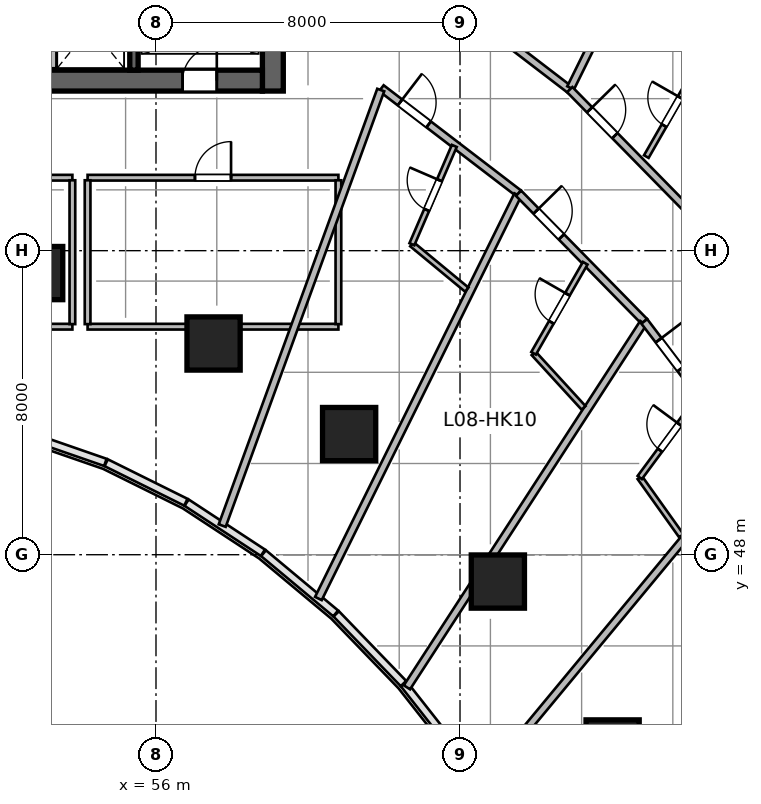
"""IFC4 building model, lengths in metres.
Left out: names, types, materials, properties, quantities, classifications, styles, units other than length and angle.
Written with IfcOpenShell. Run it as: python <this file> out.ifc"""

import sys

from ifc_helpers import new_model, si_unit, direction, frame, frame_2d, origin, origin_2d, place, context, subcontext, project, spatial, rectangle, circle, extrude, source, transform, mapped, element, fill, save


model = new_model("IFC4")
c1 = context("Model", 3, precision=1e-05, world=origin(), true_north=direction((0.0, 1.0)))
c2 = subcontext(c1, "Body", "Model", "MODEL_VIEW")
j1 = project(units=[si_unit("LENGTHUNIT", "METRE"), si_unit("PLANEANGLEUNIT", "RADIAN")], contexts=[c1])
p1 = place(None, origin())
s1 = spatial("IfcSite", under=j1, at=p1, CompositionType="ELEMENT")
p2 = place(p1, origin())
s2 = spatial("IfcBuilding", under=s1, at=p2, CompositionType="ELEMENT")
p3 = place(p2, frame((0.0, 0.0, 42.6)))
s3 = spatial("IfcBuildingStorey", under=s2, at=p3, CompositionType="ELEMENT", Elevation=42.6)
m1 = source(origin(), c2, "Body", "SweptSolid", [
    extrude(rectangle(XDim=12.0, YDim=0.55, at=frame_2d((6.0, 0.0))), origin(), (0.0, 0.0, 1.0), 3.6),
])
p4 = place(p3, frame((59.075, 60.2, 0.0), z_axis=(0.0, 0.0, 1.0), x_axis=(0.0, 1.0, 0.0)))
e1 = element("IfcWall", 1, at=p4, inside=s3, PredefinedType="SHEAR", context=c2, shape_type="MappedRepresentation", body=[
    mapped(m1, transform((0.0, 0.0, 0.0), scale=1.0)),
])
m2 = source(origin(), c2, "Body", "SweptSolid", [
    extrude(rectangle(XDim=21.6, YDim=0.55, at=frame_2d((10.8, 0.0))), origin(), (0.0, 0.0, 1.0), 3.6),
])
p5 = place(p3, frame((37.2, 60.475, 0.0), z_axis=(0.0, 0.0, 1.0), x_axis=(1.0, 0.0, 0.0)))
e2 = element("IfcWall", 2, at=p5, inside=s3, PredefinedType="SHEAR", context=c2, shape_type="MappedRepresentation", body=[
    mapped(m2, transform((0.0, 0.0, 0.0), scale=1.0)),
])
p6 = place(p5, frame((1.1, 0.0, 0.0)))
e3 = element("IfcOpeningElement", 3, at=p6, cuts=e2, PredefinedType="OPENING", context=c2, shape_type="SweptSolid", body=[
    extrude(rectangle(XDim=1.15, YDim=2.15, at=frame_2d((0.575, 1.075))), frame((0.0, 0.285, 0.0), z_axis=(0.0, -1.0, 0.0), x_axis=(1.0, 0.0, 0.0)), (0.0, 0.0, 1.0), 0.57),
])
p7 = place(p5, frame((19.5, 0.0, 0.0)))
e4 = element("IfcOpeningElement", 4, at=p7, cuts=e2, PredefinedType="OPENING", context=c2, shape_type="SweptSolid", body=[
    extrude(rectangle(XDim=0.9, YDim=2.1, at=frame_2d((0.45, 1.05))), frame((0.0, 0.285, 0.0), z_axis=(0.0, -1.0, 0.0), x_axis=(1.0, 0.0, 0.0)), (0.0, 0.0, 1.0), 0.57),
])
p8 = place(p5, frame((12.02, 0.0, 0.0)))
e5 = element("IfcOpeningElement", 5, at=p8, cuts=e2, PredefinedType="OPENING", context=c2, shape_type="SweptSolid", body=[
    extrude(rectangle(XDim=1.6, YDim=2.15, at=frame_2d((0.8, 1.075))), frame((0.0, 0.285, 0.0), z_axis=(0.0, -1.0, 0.0), x_axis=(1.0, 0.0, 0.0)), (0.0, 0.0, 1.0), 0.57),
])
m3 = source(origin(), c2, "Body", "SweptSolid", [
    extrude(rectangle(XDim=10.9, YDim=0.22, at=frame_2d((5.45, 0.0))), origin(), (0.0, 0.0, 1.0), 3.6),
])
p9 = place(p3, frame((55.42, 60.75, 0.0), z_axis=(0.0, 0.0, 1.0), x_axis=(0.0, 1.0, 0.0)))
e6 = element("IfcWall", 6, at=p9, inside=s3, PredefinedType="SHEAR", context=c2, shape_type="MappedRepresentation", body=[
    mapped(m3, transform((0.0, 0.0, 0.0), scale=1.0)),
])
p10 = place(p9, frame((9.495, 0.0, 0.0)))
e7 = element("IfcOpeningElement", 7, at=p10, cuts=e6, PredefinedType="OPENING", context=c2, shape_type="SweptSolid", body=[
    extrude(rectangle(XDim=1.15, YDim=2.15, at=frame_2d((0.575, 1.075))), frame((0.0, 0.12, 0.0), z_axis=(0.0, -1.0, 0.0), x_axis=(1.0, 0.0, 0.0)), (0.0, 0.0, 1.0), 0.24),
])
m4 = source(origin(), c2, "Body", "SweptSolid", [
    extrude(circle(Radius=0.7, at=origin_2d()), origin(), (0.0, 0.0, 1.0), 3.6),
])
for number, where, z_axis, x_axis in (
    (8, (52.846, 55.411, 0.0), (0.0, 0.0, 1.0), (0.143, 0.99, 0.0)),
    (9, (57.515, 53.558, 0.0), (0.0, 0.0, 1.0), (0.289, 0.957, 0.0)),
    (10, (61.082, 51.175, 0.0), (0.0, 0.0, 1.0), (0.409, 0.912, 0.0)),
    (11, (64.996, 47.294, 0.0), (0.0, 0.0, 1.0), (0.558, 0.83, 0.0)),
    (12, (68.015, 42.955, 0.0), (0.0, 0.0, 1.0), (0.691, 0.723, 0.0)),
):
    element("IfcColumn", number, at=place(p3, frame(where, z_axis=z_axis, x_axis=x_axis)), inside=s3, PredefinedType="COLUMN", context=c2, shape_type="MappedRepresentation", body=[
        mapped(m4, transform((0.0, 0.0, 0.0), scale=1.0)),
    ])
m5 = source(origin(), c2, "Body", "SweptSolid", [
    extrude(rectangle(XDim=2.2, YDim=0.2, at=frame_2d((1.1, 0.0))), origin(), (0.0, 0.0, 1.0), 3.36),
])
p11 = place(p3, frame((53.28, 60.8, 0.0), z_axis=(0.0, 0.0, 1.0), x_axis=(0.0, 1.0, 0.0)))
e13 = element("IfcWall", 13, at=p11, inside=s3, PredefinedType="SOLIDWALL", context=c2, shape_type="MappedRepresentation", body=[
    mapped(m5, transform((0.0, 0.0, 0.0), scale=1.0)),
])
m6 = source(origin(), c2, "Body", "SweptSolid", [
    extrude(rectangle(XDim=11.6, YDim=0.15, at=frame_2d((5.8, 0.0))), origin(), (0.0, 0.0, 1.0), 3.36),
])
p12 = place(p3, frame((42.2, 54.0, 0.0), z_axis=(0.0, 0.0, 1.0), x_axis=(1.0, 0.0, 0.0)))
e14 = element("IfcWall", 14, at=p12, inside=s3, PredefinedType="PARTITIONING", context=c2, shape_type="MappedRepresentation", body=[
    mapped(m6, transform((0.0, 0.0, 0.0), scale=1.0)),
])
p13 = place(p3, frame((42.2, 57.92, 0.0), z_axis=(0.0, 0.0, 1.0), x_axis=(1.0, 0.0, 0.0)))
e15 = element("IfcWall", 15, at=p13, inside=s3, PredefinedType="PARTITIONING", context=c2, shape_type="MappedRepresentation", body=[
    mapped(m6, transform((0.0, 0.0, 0.0), scale=1.0)),
])
p14 = place(p13, frame((6.9, 0.0, 0.0)))
e16 = element("IfcOpeningElement", 16, at=p14, cuts=e15, PredefinedType="OPENING", context=c2, shape_type="SweptSolid", body=[
    extrude(rectangle(XDim=1.1, YDim=2.15, at=frame_2d((0.55, 1.075))), frame((0.0, 0.085, 0.0), z_axis=(0.0, -1.0, 0.0), x_axis=(1.0, 0.0, 0.0)), (0.0, 0.0, 1.0), 0.17),
])
m7 = source(origin(), c2, "Body", "SweptSolid", [
    extrude(rectangle(XDim=3.785, YDim=0.15, at=frame_2d((1.893, 0.0))), origin(), (0.0, 0.0, 1.0), 3.36),
])
p15 = place(p3, frame((53.8, 54.067, 0.0), z_axis=(0.0, 0.0, 1.0), x_axis=(0.0, 1.0, 0.0)))
e17 = element("IfcWall", 17, at=p15, inside=s3, PredefinedType="PARTITIONING", context=c2, shape_type="MappedRepresentation", body=[
    mapped(m7, transform((0.0, 0.0, 0.0), scale=1.0)),
])
m8 = source(origin(), c2, "Body", "SweptSolid", [
    extrude(rectangle(XDim=6.6, YDim=0.15, at=frame_2d((3.3, 0.0))), origin(), (0.0, 0.0, 1.0), 2.803),
])
p16 = place(p3, frame((54.2, 54.0, 0.0), z_axis=(0.0, 0.0, 1.0), x_axis=(1.0, 0.0, 0.0)))
e18 = element("IfcWall", 18, at=p16, inside=s3, PredefinedType="PARTITIONING", context=c2, shape_type="MappedRepresentation", body=[
    mapped(m8, transform((0.0, 0.0, 0.0), scale=1.0)),
])
m9 = source(origin(), c2, "Body", "SweptSolid", [
    extrude(rectangle(XDim=6.6, YDim=0.15, at=frame_2d((3.3, 0.0))), origin(), (0.0, 0.0, 1.0), 3.36),
])
p17 = place(p3, frame((54.2, 57.92, 0.0), z_axis=(0.0, 0.0, 1.0), x_axis=(1.0, 0.0, 0.0)))
e19 = element("IfcWall", 19, at=p17, inside=s3, PredefinedType="PARTITIONING", context=c2, shape_type="MappedRepresentation", body=[
    mapped(m9, transform((0.0, 0.0, 0.0), scale=1.0)),
])
p18 = place(p17, frame((2.825, 0.0, 0.0)))
e20 = element("IfcOpeningElement", 20, at=p18, cuts=e19, PredefinedType="OPENING", context=c2, shape_type="SweptSolid", body=[
    extrude(rectangle(XDim=0.95, YDim=2.1, at=frame_2d((0.475, 1.05))), frame((0.0, 0.085, 0.0), z_axis=(0.0, -1.0, 0.0), x_axis=(1.0, 0.0, 0.0)), (0.0, 0.0, 1.0), 0.17),
])
for number, where, z_axis, x_axis in (
    (21, (54.2, 54.067, 0.0), (0.0, 0.0, 1.0), (0.0, 1.0, 0.0)),
    (22, (60.8, 54.067, 0.0), (0.0, 0.0, 1.0), (0.0, 1.0, 0.0)),
):
    element("IfcWall", number, at=place(p3, frame(where, z_axis=z_axis, x_axis=x_axis)), inside=s3, PredefinedType="PARTITIONING", context=c2, shape_type="MappedRepresentation", body=[
        mapped(m7, transform((0.0, 0.0, 0.0), scale=1.0)),
    ])
m10 = source(origin(), c2, "Body", "SweptSolid", [
    extrude(rectangle(XDim=4.895, YDim=0.195, at=frame_2d((2.447, 0.0))), origin(), (0.0, 0.0, 1.0), 3.36),
])
p19 = place(p3, frame((63.001, 63.214, 0.0), z_axis=(0.0, 0.0, 1.0), x_axis=(0.793896075849, -0.608053468661, 0.0)))
e23 = element("IfcWall", 23, at=p19, inside=s3, PredefinedType="PARTITIONING", context=c2, shape_type="MappedRepresentation", body=[
    mapped(m10, transform((0.0, 0.0, 0.0), scale=1.0)),
])
p20 = place(p19, frame((0.7, 0.0, 0.0)))
e24 = element("IfcOpeningElement", 24, at=p20, cuts=e23, PredefinedType="OPENING", context=c2, shape_type="SweptSolid", body=[
    extrude(rectangle(XDim=0.95, YDim=2.15, at=frame_2d((0.475, 1.075))), frame((0.0, 0.107, 0.0), z_axis=(0.0, -1.0, 0.0), x_axis=(1.0, 0.0, 0.0)), (0.0, 0.0, 1.0), 0.215),
])
m11 = source(origin(), c2, "Body", "SweptSolid", [
    extrude(rectangle(XDim=11.77, YDim=0.195, at=frame_2d((5.885, 0.0))), origin(), (0.0, 0.0, 1.0), 3.36),
])
p21 = place(p3, frame((66.909, 60.282, 0.0), z_axis=(0.0, 0.0, 1.0), x_axis=(0.44286060326, 0.896590478468, 0.0)))
e25 = element("IfcWall", 25, at=p21, inside=s3, PredefinedType="PARTITIONING", context=c2, shape_type="MappedRepresentation", body=[
    mapped(m11, transform((0.0, 0.0, 0.0), scale=1.0)),
])
m12 = source(origin(), c2, "Body", "SweptSolid", [
    extrude(rectangle(XDim=4.546, YDim=0.195, at=frame_2d((2.273, 0.0))), origin(), (0.0, 0.0, 1.0), 3.36),
])
p22 = place(p3, frame((61.931, 60.275, 0.0), z_axis=(0.0, 0.0, 1.0), x_axis=(0.793907931297, -0.608037989457, 0.0)))
e26 = element("IfcWall", 26, at=p22, inside=s3, PredefinedType="PARTITIONING", context=c2, shape_type="MappedRepresentation", body=[
    mapped(m12, transform((0.0, 0.0, 0.0), scale=1.0)),
])
p23 = place(p22, frame((0.616, 0.0, 0.0)))
e27 = element("IfcOpeningElement", 27, at=p23, cuts=e26, PredefinedType="OPENING", context=c2, shape_type="SweptSolid", body=[
    extrude(rectangle(XDim=0.95, YDim=2.15, at=frame_2d((0.475, 1.075))), frame((0.0, 0.107, 0.0), z_axis=(0.0, -1.0, 0.0), x_axis=(1.0, 0.0, 0.0)), (0.0, 0.0, 1.0), 0.215),
])
m13 = source(origin(), c2, "Body", "SweptSolid", [
    extrude(rectangle(XDim=12.196, YDim=0.195, at=frame_2d((6.098, 0.0))), origin(), (0.0, 0.0, 1.0), 3.36),
])
p24 = place(p3, frame((57.742, 48.766, 0.0), z_axis=(0.0, 0.0, 1.0), x_axis=(0.342022711534, 0.939691686031, 0.0)))
e28 = element("IfcWall", 28, at=p24, inside=s3, PredefinedType="PARTITIONING", context=c2, shape_type="MappedRepresentation", body=[
    mapped(m13, transform((0.0, 0.0, 0.0), scale=1.0)),
])
m14 = source(origin(), c2, "Body", "SweptSolid", [
    extrude(rectangle(XDim=11.844, YDim=0.195, at=frame_2d((5.922, 0.0))), origin(), (0.0, 0.0, 1.0), 3.36),
])
p25 = place(p3, frame((60.273, 46.848, 0.0), z_axis=(0.0, 0.0, 1.0), x_axis=(0.442871152218, 0.896585267854, 0.0)))
e29 = element("IfcWall", 29, at=p25, inside=s3, PredefinedType="PARTITIONING", context=c2, shape_type="MappedRepresentation", body=[
    mapped(m14, transform((0.0, 0.0, 0.0), scale=1.0)),
])
m15 = source(origin(), c2, "Body", "SweptSolid", [
    extrude(rectangle(XDim=1.873, YDim=0.14, at=frame_2d((0.937, 0.0))), origin(), (0.0, 0.0, 1.0), 3.36),
])
p26 = place(p3, frame((62.734, 56.169, 0.0), z_axis=(0.0, 0.0, 1.0), x_axis=(0.77069451688, -0.637204803537, 0.0)))
e30 = element("IfcWall", 30, at=p26, inside=s3, PredefinedType="PARTITIONING", context=c2, shape_type="MappedRepresentation", body=[
    mapped(m15, transform((0.0, 0.0, 0.0), scale=1.0)),
])
m16 = source(origin(), c2, "Body", "SweptSolid", [
    extrude(rectangle(XDim=2.817, YDim=0.14, at=frame_2d((1.409, 0.0))), origin(), (0.0, 0.0, 1.0), 3.36),
])
p27 = place(p3, frame((62.734, 56.169, 0.0), z_axis=(0.0, 0.0, 1.0), x_axis=(0.395999429727, 0.918250756415, 0.0)))
e31 = element("IfcWall", 31, at=p27, inside=s3, PredefinedType="PARTITIONING", context=c2, shape_type="MappedRepresentation", body=[
    mapped(m16, transform((0.0, 0.0, 0.0), scale=1.0)),
])
p28 = place(p27, frame((0.984, 0.0, 0.0)))
e32 = element("IfcOpeningElement", 32, at=p28, cuts=e31, PredefinedType="OPENING", context=c2, shape_type="SweptSolid", body=[
    extrude(rectangle(XDim=0.85, YDim=2.05, at=frame_2d((0.425, 1.025))), frame((0.0, 0.08, 0.0), z_axis=(0.0, -1.0, 0.0), x_axis=(1.0, 0.0, 0.0)), (0.0, 0.0, 1.0), 0.16),
])
m17 = source(origin(), c2, "Body", "SweptSolid", [
    extrude(rectangle(XDim=5.087, YDim=0.195, at=frame_2d((2.543, 0.0))), origin(), (0.0, 0.0, 1.0), 3.36),
])
p29 = place(p3, frame((66.887, 60.238, 0.0), z_axis=(0.0, 0.0, 1.0), x_axis=(0.700428330775, -0.7137227427, 0.0)))
e33 = element("IfcWall", 33, at=p29, inside=s3, PredefinedType="PARTITIONING", context=c2, shape_type="MappedRepresentation", body=[
    mapped(m17, transform((0.0, 0.0, 0.0), scale=1.0)),
])
p30 = place(p29, frame((0.746, 0.0, 0.0)))
e34 = element("IfcOpeningElement", 34, at=p30, cuts=e33, PredefinedType="OPENING", context=c2, shape_type="SweptSolid", body=[
    extrude(rectangle(XDim=0.95, YDim=2.15, at=frame_2d((0.475, 1.075))), frame((0.0, 0.107, 0.0), z_axis=(0.0, -1.0, 0.0), x_axis=(1.0, 0.0, 0.0)), (0.0, 0.0, 1.0), 0.215),
])
m18 = source(origin(), c2, "Body", "SweptSolid", [
    extrude(rectangle(XDim=2.732, YDim=0.14, at=frame_2d((1.366, 0.0))), origin(), (0.0, 0.0, 1.0), 3.36),
])
p31 = place(p3, frame((68.902, 58.476, 0.0), z_axis=(0.0, 0.0, 1.0), x_axis=(0.497254966372, 0.867604459658, 0.0)))
e35 = element("IfcWall", 35, at=p31, inside=s3, PredefinedType="PARTITIONING", context=c2, shape_type="MappedRepresentation", body=[
    mapped(m18, transform((0.0, 0.0, 0.0), scale=1.0)),
])
p32 = place(p31, frame((0.941, 0.0, 0.0)))
e36 = element("IfcOpeningElement", 36, at=p32, cuts=e35, PredefinedType="OPENING", context=c2, shape_type="SweptSolid", body=[
    extrude(rectangle(XDim=0.85, YDim=2.05, at=frame_2d((0.425, 1.025))), frame((0.0, 0.08, 0.0), z_axis=(0.0, -1.0, 0.0), x_axis=(1.0, 0.0, 0.0)), (0.0, 0.0, 1.0), 0.16),
])
m19 = source(origin(), c2, "Body", "SweptSolid", [
    extrude(rectangle(XDim=4.724, YDim=0.195, at=frame_2d((2.362, 0.0))), origin(), (0.0, 0.0, 1.0), 3.36),
])
p33 = place(p3, frame((65.541, 57.511, 0.0), z_axis=(0.0, 0.0, 1.0), x_axis=(0.700435057457, -0.713716141253, 0.0)))
e37 = element("IfcWall", 37, at=p33, inside=s3, PredefinedType="PARTITIONING", context=c2, shape_type="MappedRepresentation", body=[
    mapped(m19, transform((0.0, 0.0, 0.0), scale=1.0)),
])
p34 = place(p33, frame((0.659, 0.0, 0.0)))
e38 = element("IfcOpeningElement", 38, at=p34, cuts=e37, PredefinedType="OPENING", context=c2, shape_type="SweptSolid", body=[
    extrude(rectangle(XDim=0.95, YDim=2.15, at=frame_2d((0.475, 1.075))), frame((0.0, 0.107, 0.0), z_axis=(0.0, -1.0, 0.0), x_axis=(1.0, 0.0, 0.0)), (0.0, 0.0, 1.0), 0.215),
])
m20 = source(origin(), c2, "Body", "SweptSolid", [
    extrude(rectangle(XDim=11.429, YDim=0.195, at=frame_2d((5.714, 0.0))), origin(), (0.0, 0.0, 1.0), 3.36),
])
p35 = place(p3, frame((62.604, 44.511, 0.0), z_axis=(0.0, 0.0, 1.0), x_axis=(0.544215487077, 0.838945471187, 0.0)))
e39 = element("IfcWall", 39, at=p35, inside=s3, PredefinedType="PARTITIONING", context=c2, shape_type="MappedRepresentation", body=[
    mapped(m20, transform((0.0, 0.0, 0.0), scale=1.0)),
])
m21 = source(origin(), c2, "Body", "SweptSolid", [
    extrude(rectangle(XDim=1.947, YDim=0.14, at=frame_2d((0.973, 0.0))), origin(), (0.0, 0.0, 1.0), 2.803),
])
p36 = place(p3, frame((65.936, 53.3, 0.0), z_axis=(0.0, 0.0, 1.0), x_axis=(0.675383794012, -0.737466426888, 0.0)))
e40 = element("IfcWall", 40, at=p36, inside=s3, PredefinedType="PARTITIONING", context=c2, shape_type="MappedRepresentation", body=[
    mapped(m21, transform((0.0, 0.0, 0.0), scale=1.0)),
])
m22 = source(origin(), c2, "Body", "SweptSolid", [
    extrude(rectangle(XDim=2.731, YDim=0.14, at=frame_2d((1.366, 0.0))), origin(), (0.0, 0.0, 1.0), 3.36),
])
p37 = place(p3, frame((65.936, 53.3, 0.0), z_axis=(0.0, 0.0, 1.0), x_axis=(0.497120404056, 0.867681568244, 0.0)))
e41 = element("IfcWall", 41, at=p37, inside=s3, PredefinedType="PARTITIONING", context=c2, shape_type="MappedRepresentation", body=[
    mapped(m22, transform((0.0, 0.0, 0.0), scale=1.0)),
])
p38 = place(p37, frame((0.941, 0.0, 0.0)))
e42 = element("IfcOpeningElement", 42, at=p38, cuts=e41, PredefinedType="OPENING", context=c2, shape_type="SweptSolid", body=[
    extrude(rectangle(XDim=0.85, YDim=2.05, at=frame_2d((0.425, 1.025))), frame((0.0, 0.08, 0.0), z_axis=(0.0, -1.0, 0.0), x_axis=(1.0, 0.0, 0.0)), (0.0, 0.0, 1.0), 0.16),
])
m23 = source(origin(), c2, "Body", "SweptSolid", [
    extrude(rectangle(XDim=4.576, YDim=0.195, at=frame_2d((2.288, 0.0))), origin(), (0.0, 0.0, 1.0), 3.36),
])
p39 = place(p3, frame((68.85, 54.139, 0.0), z_axis=(0.0, 0.0, 1.0), x_axis=(0.604795096156, -0.796381122118, 0.0)))
e43 = element("IfcWall", 43, at=p39, inside=s3, PredefinedType="PARTITIONING", context=c2, shape_type="MappedRepresentation", body=[
    mapped(m23, transform((0.0, 0.0, 0.0), scale=1.0)),
])
p40 = place(p39, frame((0.623, 0.0, 0.0)))
e44 = element("IfcOpeningElement", 44, at=p40, cuts=e43, PredefinedType="OPENING", context=c2, shape_type="SweptSolid", body=[
    extrude(rectangle(XDim=0.95, YDim=2.15, at=frame_2d((0.475, 1.075))), frame((0.0, 0.107, 0.0), z_axis=(0.0, -1.0, 0.0), x_axis=(1.0, 0.0, 0.0)), (0.0, 0.0, 1.0), 0.215),
])
m24 = source(origin(), c2, "Body", "SweptSolid", [
    extrude(rectangle(XDim=11.053, YDim=0.195, at=frame_2d((5.527, 0.0))), origin(), (0.0, 0.0, 1.0), 3.36),
])
p41 = place(p3, frame((64.534, 41.949, 0.0), z_axis=(0.0, 0.0, 1.0), x_axis=(0.638131235571, 0.769927611005, 0.0)))
e45 = element("IfcWall", 45, at=p41, inside=s3, PredefinedType="PARTITIONING", context=c2, shape_type="MappedRepresentation", body=[
    mapped(m24, transform((0.0, 0.0, 0.0), scale=1.0)),
])
m25 = source(origin(), c2, "Body", "SweptSolid", [
    extrude(rectangle(XDim=1.884, YDim=0.14, at=frame_2d((0.942, 0.0))), origin(), (0.0, 0.0, 1.0), 2.803),
])
p42 = place(p3, frame((68.729, 50.031, 0.0), z_axis=(0.0, 0.0, 1.0), x_axis=(0.580833492897, -0.814022391295, 0.0)))
e46 = element("IfcWall", 46, at=p42, inside=s3, PredefinedType="PARTITIONING", context=c2, shape_type="MappedRepresentation", body=[
    mapped(m25, transform((0.0, 0.0, 0.0), scale=1.0)),
])
m26 = source(origin(), c2, "Body", "SweptSolid", [
    extrude(rectangle(XDim=2.64, YDim=0.14, at=frame_2d((1.32, 0.0))), origin(), (0.0, 0.0, 1.0), 3.36),
])
p43 = place(p3, frame((68.729, 50.031, 0.0), z_axis=(0.0, 0.0, 1.0), x_axis=(0.594674469522, 0.803966588422, 0.0)))
e47 = element("IfcWall", 47, at=p43, inside=s3, PredefinedType="PARTITIONING", context=c2, shape_type="MappedRepresentation", body=[
    mapped(m26, transform((0.0, 0.0, 0.0), scale=1.0)),
])
p44 = place(p43, frame((0.895, 0.0, 0.0)))
e48 = element("IfcOpeningElement", 48, at=p44, cuts=e47, PredefinedType="OPENING", context=c2, shape_type="SweptSolid", body=[
    extrude(rectangle(XDim=0.85, YDim=2.05, at=frame_2d((0.425, 1.025))), frame((0.0, 0.08, 0.0), z_axis=(0.0, -1.0, 0.0), x_axis=(1.0, 0.0, 0.0)), (0.0, 0.0, 1.0), 0.16),
])
m27 = source(origin(), c2, "Body", "SweptSolid", [
    extrude(rectangle(XDim=0.9, YDim=2.1, at=frame_2d((0.45, 1.05))), frame((0.0, 0.025, 0.0), z_axis=(0.0, -1.0, 0.0), x_axis=(1.0, 0.0, 0.0)), (0.0, 0.0, 1.0), 0.05),
])
p45 = place(p7, origin())
e49 = element("IfcDoor", 49, at=p45, inside=s3, OperationType="SINGLE_SWING_RIGHT", PredefinedType="DOOR", context=c2, shape_type="MappedRepresentation", body=[
    mapped(m27, transform((0.0, 0.0, 0.0), scale=1.0)),
])
fill(e4, e49)
m28 = source(origin(), c2, "Body", "SweptSolid", [
    extrude(rectangle(XDim=0.95, YDim=2.1, at=frame_2d((0.475, 1.05))), frame((0.0, 0.025, 0.0), z_axis=(0.0, -1.0, 0.0), x_axis=(1.0, 0.0, 0.0)), (0.0, 0.0, 1.0), 0.05),
])
p46 = place(p18, origin())
e50 = element("IfcDoor", 50, at=p46, inside=s3, OperationType="SINGLE_SWING_RIGHT", PredefinedType="DOOR", context=c2, shape_type="MappedRepresentation", body=[
    mapped(m28, transform((0.0, 0.0, 0.0), scale=1.0)),
])
fill(e20, e50)
m29 = source(origin(), c2, "Body", "SweptSolid", [
    extrude(rectangle(XDim=0.95, YDim=2.15, at=frame_2d((0.475, 1.075))), frame((0.0, 0.025, 0.0), z_axis=(0.0, -1.0, 0.0), x_axis=(1.0, 0.0, 0.0)), (0.0, 0.0, 1.0), 0.05),
])
p47 = place(p23, origin())
e51 = element("IfcDoor", 51, at=p47, inside=s3, OperationType="SINGLE_SWING_LEFT", PredefinedType="DOOR", context=c2, shape_type="MappedRepresentation", body=[
    mapped(m29, transform((0.0, 0.0, 0.0), scale=1.0)),
])
fill(e27, e51)
m30 = source(origin(), c2, "Body", "SweptSolid", [
    extrude(rectangle(XDim=0.85, YDim=2.05, at=frame_2d((0.425, 1.025))), frame((0.0, 0.025, 0.0), z_axis=(0.0, -1.0, 0.0), x_axis=(1.0, 0.0, 0.0)), (0.0, 0.0, 1.0), 0.05),
])
p48 = place(p28, origin())
e52 = element("IfcDoor", 52, at=p48, inside=s3, OperationType="SINGLE_SWING_RIGHT", PredefinedType="DOOR", context=c2, shape_type="MappedRepresentation", body=[
    mapped(m30, transform((0.0, 0.0, 0.0), scale=1.0)),
])
fill(e32, e52)
p49 = place(p30, origin())
e53 = element("IfcDoor", 53, at=p49, inside=s3, OperationType="SINGLE_SWING_LEFT", PredefinedType="DOOR", context=c2, shape_type="MappedRepresentation", body=[
    mapped(m29, transform((0.0, 0.0, 0.0), scale=1.0)),
])
fill(e34, e53)
p50 = place(p32, origin())
e54 = element("IfcDoor", 54, at=p50, inside=s3, OperationType="SINGLE_SWING_RIGHT", PredefinedType="DOOR", context=c2, shape_type="MappedRepresentation", body=[
    mapped(m30, transform((0.0, 0.0, 0.0), scale=1.0)),
])
fill(e36, e54)
p51 = place(p34, origin())
e55 = element("IfcDoor", 55, at=p51, inside=s3, OperationType="SINGLE_SWING_LEFT", PredefinedType="DOOR", context=c2, shape_type="MappedRepresentation", body=[
    mapped(m29, transform((0.0, 0.0, 0.0), scale=1.0)),
])
fill(e38, e55)
p52 = place(p38, origin())
e56 = element("IfcDoor", 56, at=p52, inside=s3, OperationType="SINGLE_SWING_RIGHT", PredefinedType="DOOR", context=c2, shape_type="MappedRepresentation", body=[
    mapped(m30, transform((0.0, 0.0, 0.0), scale=1.0)),
])
fill(e42, e56)
p53 = place(p40, origin())
e57 = element("IfcDoor", 57, at=p53, inside=s3, OperationType="SINGLE_SWING_LEFT", PredefinedType="DOOR", context=c2, shape_type="MappedRepresentation", body=[
    mapped(m29, transform((0.0, 0.0, 0.0), scale=1.0)),
])
fill(e44, e57)
p54 = place(p44, origin())
e58 = element("IfcDoor", 58, at=p54, inside=s3, OperationType="SINGLE_SWING_RIGHT", PredefinedType="DOOR", context=c2, shape_type="MappedRepresentation", body=[
    mapped(m30, transform((0.0, 0.0, 0.0), scale=1.0)),
])
fill(e48, e58)
save(model, sys.argv[1])
